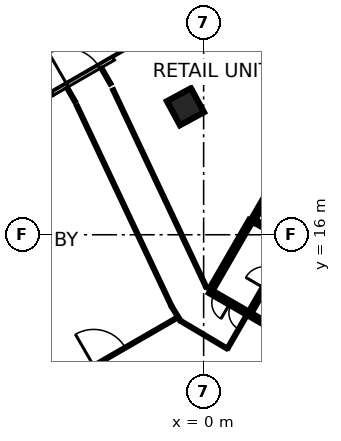
"""IFC4 building model, lengths in metres.
Left out: names, types, materials, properties, quantities, classifications, styles, units other than length and angle.
Written with IfcOpenShell. Run it as: python <this file> out.ifc"""

import sys

from ifc_helpers import new_model, si_unit, direction, frame, frame_2d, origin, origin_2d, place, context, subcontext, project, spatial, rectangle, extrude, element, fill, save


model = new_model("IFC4")
c1 = context("Model", 3, precision=1e-05, world=origin(), true_north=direction((0.0, 1.0)))
c2 = subcontext(c1, "Body", "Model", "MODEL_VIEW")
j1 = project(units=[si_unit("LENGTHUNIT", "METRE"), si_unit("PLANEANGLEUNIT", "RADIAN")], contexts=[c1])
p1 = place(None, origin())
s1 = spatial("IfcSite", under=j1, at=p1, CompositionType="ELEMENT")
p2 = place(p1, origin())
s2 = spatial("IfcBuilding", under=s1, at=p2, CompositionType="ELEMENT")
p3 = place(p2, origin())
s3 = spatial("IfcBuildingStorey", under=s2, at=p3, CompositionType="ELEMENT", Elevation=0.0)
p4 = place(p3, frame((-1.197, 24.423, -0.45), z_axis=(0.0, 0.0, 1.0), x_axis=(-0.476198301069, 0.879337920289, 0.0)))
e1 = element("IfcColumn", 1, at=p4, inside=s3, PredefinedType="COLUMN", context=c2, shape_type="SweptSolid", body=[
    extrude(rectangle(XDim=1.8, YDim=1.8, at=origin_2d()), origin(), (0.0, 0.0, 1.0), 5.15),
])
p5 = place(p3, frame((-9.929, 25.29, 0.0), z_axis=(0.0, 0.0, 1.0), x_axis=(0.866216377649, 0.499669077583, 0.0)))
e2 = element("IfcWall", 2, at=p5, inside=s3, PredefinedType="SOLIDWALL", context=c2, shape_type="SweptSolid", body=[
    extrude(rectangle(XDim=4.62, YDim=0.25, at=frame_2d((2.31, 0.0))), origin(), (0.0, 0.0, 1.0), 7.1),
])
p6 = place(p5, frame((1.11, 0.0, 0.0)))
e3 = element("IfcOpeningElement", 3, at=p6, cuts=e2, PredefinedType="OPENING", context=c2, shape_type="SweptSolid", body=[
    extrude(rectangle(XDim=2.4, YDim=2.4, at=frame_2d((1.2, 1.2))), frame((0.0, 0.135, 0.0), z_axis=(0.0, -1.0, 0.0), x_axis=(1.0, 0.0, 0.0)), (0.0, 0.0, 1.0), 0.27),
])
p7 = place(p3, frame((-13.93, 22.982, 0.0), z_axis=(0.0, 0.0, 1.0), x_axis=(0.866216377649, 0.499669077583, 0.0)))
e4 = element("IfcWall", 4, at=p7, inside=s3, PredefinedType="SOLIDWALL", context=c2, shape_type="SweptSolid", body=[
    extrude(rectangle(XDim=4.62, YDim=0.25, at=frame_2d((2.31, 0.0))), origin(), (0.0, 0.0, 1.0), 7.1),
])
p8 = place(p3, frame((10.42, 6.498, 0.0), z_axis=(0.0, 0.0, 1.0), x_axis=(-0.866021906294, 0.500006057782, 0.0)))
e5 = element("IfcWall", 5, at=p8, inside=s3, PredefinedType="SHEAR", context=c2, shape_type="SweptSolid", body=[
    extrude(rectangle(XDim=11.55, YDim=0.25, at=frame_2d((5.775, 0.0))), origin(), (0.0, 0.0, 1.0), 7.1),
])
p9 = place(p8, frame((10.025, 0.0, 0.0)))
e6 = element("IfcOpeningElement", 6, at=p9, cuts=e5, PredefinedType="OPENING", context=c2, shape_type="SweptSolid", body=[
    extrude(rectangle(XDim=1.2, YDim=2.1, at=frame_2d((0.6, 1.05))), frame((0.0, 0.135, 0.0), z_axis=(0.0, -1.0, 0.0), x_axis=(1.0, 0.0, 0.0)), (0.0, 0.0, 1.0), 0.27),
])
p10 = place(p8, frame((8.725, 0.0, 0.0)))
e7 = element("IfcOpeningElement", 7, at=p10, cuts=e5, PredefinedType="OPENING", context=c2, shape_type="SweptSolid", body=[
    extrude(rectangle(XDim=1.2, YDim=2.1, at=frame_2d((0.6, 1.05))), frame((0.0, 0.135, 0.0), z_axis=(0.0, -1.0, 0.0), x_axis=(1.0, 0.0, 0.0)), (0.0, 0.0, 1.0), 0.27),
])
p11 = place(p3, frame((3.179, 16.856, 0.0), z_axis=(0.0, 0.0, 1.0), x_axis=(0.500004234368, 0.866022959057, 0.0)))
e8 = element("IfcWall", 8, at=p11, inside=s3, PredefinedType="SHEAR", context=c2, shape_type="SweptSolid", body=[
    extrude(rectangle(XDim=6.25, YDim=0.25, at=frame_2d((3.125, 0.0))), origin(), (0.0, 0.0, 1.0), 7.1),
])
p12 = place(p3, frame((0.48, 12.381, 0.0), z_axis=(0.0, 0.0, 1.0), x_axis=(0.49999885962, 0.866026062182, 0.0)))
e9 = element("IfcWall", 9, at=p12, inside=s3, PredefinedType="SHEAR", context=c2, shape_type="SweptSolid", body=[
    extrude(rectangle(XDim=5.225, YDim=0.25, at=frame_2d((2.612, 0.0))), origin(), (0.0, 0.0, 1.0), 7.1),
])
p13 = place(p3, frame((3.057, 10.895, 0.0), z_axis=(0.0, 0.0, 1.0), x_axis=(0.499989418164, 0.866031513124, 0.0)))
e10 = element("IfcWall", 10, at=p13, inside=s3, PredefinedType="SHEAR", context=c2, shape_type="SweptSolid", body=[
    extrude(rectangle(XDim=5.251, YDim=0.2, at=frame_2d((2.625, 0.0))), origin(), (0.0, 0.0, 1.0), 7.1),
])
p14 = place(p13, frame((1.849, 0.0, 0.0)))
e11 = element("IfcOpeningElement", 11, at=p14, cuts=e10, PredefinedType="OPENING", context=c2, shape_type="SweptSolid", body=[
    extrude(rectangle(XDim=1.4, YDim=2.1, at=frame_2d((0.7, 1.05))), frame((0.0, 0.11, 0.0), z_axis=(0.0, -1.0, 0.0), x_axis=(1.0, 0.0, 0.0)), (0.0, 0.0, 1.0), 0.22),
])
p15 = place(p3, frame((5.725, 15.531, 0.0), z_axis=(0.0, 0.0, 1.0), x_axis=(-0.866037306777, 0.499979382845, 0.0)))
e12 = element("IfcWall", 12, at=p15, inside=s3, PredefinedType="SHEAR", context=c2, shape_type="SweptSolid", body=[
    extrude(rectangle(XDim=2.742, YDim=0.2, at=frame_2d((1.371, 0.0))), origin(), (0.0, 0.0, 1.0), 7.1),
])
p16 = place(p15, frame((0.743, 0.0, 0.0)))
e13 = element("IfcOpeningElement", 13, at=p16, cuts=e12, PredefinedType="OPENING", context=c2, shape_type="SweptSolid", body=[
    extrude(rectangle(XDim=1.3, YDim=2.1, at=frame_2d((0.65, 1.05))), frame((0.0, 0.11, 0.0), z_axis=(0.0, -1.0, 0.0), x_axis=(1.0, 0.0, 0.0)), (0.0, 0.0, 1.0), 0.22),
])
p17 = place(p3, frame((-8.996, 25.695, 0.0), z_axis=(0.0, 0.0, 1.0), x_axis=(0.499734982339, -0.866178357746, 0.0)))
e14 = element("IfcWall", 14, at=p17, inside=s3, PredefinedType="PARTITIONING", context=c2, shape_type="SweptSolid", body=[
    extrude(rectangle(XDim=1.125, YDim=0.2, at=frame_2d((0.562, 0.0))), origin(), (0.0, 0.0, 1.0), 7.1),
])
p18 = place(p3, frame((-8.359, 24.54, 0.0), z_axis=(0.0, 0.0, 1.0), x_axis=(0.426724650049, -0.904381597027, 0.0)))
e15 = element("IfcWall", 15, at=p18, inside=s3, PredefinedType="PARTITIONING", context=c2, shape_type="SweptSolid", body=[
    extrude(rectangle(XDim=14.649, YDim=0.2, at=frame_2d((7.324, 0.0))), origin(), (0.0, 0.0, 1.0), 4.7),
])
p19 = place(p3, frame((-6.744, 26.995, 0.0), z_axis=(0.0, 0.0, 1.0), x_axis=(0.499504866029, -0.866311080856, 0.0)))
e16 = element("IfcWall", 16, at=p19, inside=s3, PredefinedType="PARTITIONING", context=c2, shape_type="SweptSolid", body=[
    extrude(rectangle(XDim=1.295, YDim=0.2, at=frame_2d((0.647, 0.0))), origin(), (0.0, 0.0, 1.0), 7.1),
])
p20 = place(p3, frame((-5.981, 25.592, 0.0), z_axis=(0.0, 0.0, 1.0), x_axis=(0.426730602237, -0.904378788514, 0.0)))
e17 = element("IfcWall", 17, at=p20, inside=s3, PredefinedType="PARTITIONING", context=c2, shape_type="SweptSolid", body=[
    extrude(rectangle(XDim=14.442, YDim=0.2, at=frame_2d((7.221, 0.0))), origin(), (0.0, 0.0, 1.0), 4.7),
])
p21 = place(p3, frame((-2.108, 11.292, 0.0), z_axis=(0.0, 0.0, 1.0), x_axis=(0.523562666548, -0.85198716786, 0.0)))
e18 = element("IfcWall", 18, at=p21, inside=s3, PredefinedType="PARTITIONING", context=c2, shape_type="SweptSolid", body=[
    extrude(rectangle(XDim=1.121, YDim=0.2, at=frame_2d((0.561, 0.0))), origin(), (0.0, 0.0, 1.0), 7.1),
])
p22 = place(p3, frame((-1.521, 10.337, 0.0), z_axis=(0.0, 0.0, 1.0), x_axis=(0.859480916886, -0.511167833015, 0.0)))
e19 = element("IfcWall", 19, at=p22, inside=s3, PredefinedType="PARTITIONING", context=c2, shape_type="SweptSolid", body=[
    extrude(rectangle(XDim=3.586, YDim=0.2, at=frame_2d((1.793, 0.0))), origin(), (0.0, 0.0, 1.0), 7.1),
])
p23 = place(p3, frame((1.561, 8.504, 0.0), z_axis=(0.0, 0.0, 1.0), x_axis=(0.5001186023, 0.865956917885, 0.0)))
e20 = element("IfcWall", 20, at=p23, inside=s3, PredefinedType="PARTITIONING", context=c2, shape_type="SweptSolid", body=[
    extrude(rectangle(XDim=2.507, YDim=0.2, at=frame_2d((1.254, 0.0))), origin(), (0.0, 0.0, 1.0), 7.1),
])
p24 = place(p3, frame((-10.652, 5.399, 0.0), z_axis=(0.0, 0.0, 1.0), x_axis=(0.866043217385, 0.49996914467, 0.0)))
e21 = element("IfcWall", 21, at=p24, inside=s3, PredefinedType="PARTITIONING", context=c2, shape_type="SweptSolid", body=[
    extrude(rectangle(XDim=10.366, YDim=0.2, at=frame_2d((5.183, 0.0))), origin(), (0.0, 0.0, 1.0), 7.1),
])
p25 = place(p24, frame((3.948, 0.0, 0.0)))
e22 = element("IfcOpeningElement", 22, at=p25, cuts=e21, PredefinedType="OPENING", context=c2, shape_type="SweptSolid", body=[
    extrude(rectangle(XDim=2.4, YDim=2.1, at=frame_2d((1.2, 1.05))), frame((0.0, 0.11, 0.0), z_axis=(0.0, -1.0, 0.0), x_axis=(1.0, 0.0, 0.0)), (0.0, 0.0, 1.0), 0.22),
])
p26 = place(p6, origin())
e23 = element("IfcDoor", 23, at=p26, inside=s3, OperationType="DOUBLE_DOOR_DOUBLE_SWING", PredefinedType="DOOR", context=c2, shape_type="SweptSolid", body=[
    extrude(rectangle(XDim=2.4, YDim=2.4, at=frame_2d((1.2, 1.2))), frame((0.0, 0.025, 0.0), z_axis=(0.0, -1.0, 0.0), x_axis=(1.0, 0.0, 0.0)), (0.0, 0.0, 1.0), 0.05),
])
fill(e3, e23)
p27 = place(p9, origin())
e24 = element("IfcDoor", 24, at=p27, inside=s3, OperationType="SINGLE_SWING_LEFT", PredefinedType="DOOR", context=c2, shape_type="SweptSolid", body=[
    extrude(rectangle(XDim=1.2, YDim=2.1, at=frame_2d((0.6, 1.05))), frame((0.0, 0.025, 0.0), z_axis=(0.0, -1.0, 0.0), x_axis=(1.0, 0.0, 0.0)), (0.0, 0.0, 1.0), 0.05),
])
fill(e6, e24)
p28 = place(p10, origin())
e25 = element("IfcDoor", 25, at=p28, inside=s3, OperationType="SINGLE_SWING_RIGHT", PredefinedType="DOOR", context=c2, shape_type="SweptSolid", body=[
    extrude(rectangle(XDim=1.2, YDim=2.1, at=frame_2d((0.6, 1.05))), frame((0.0, 0.025, 0.0), z_axis=(0.0, -1.0, 0.0), x_axis=(1.0, 0.0, 0.0)), (0.0, 0.0, 1.0), 0.05),
])
fill(e7, e25)
p29 = place(p25, origin())
e26 = element("IfcDoor", 26, at=p29, inside=s3, OperationType="DOUBLE_DOOR_SINGLE_SWING", PredefinedType="DOOR", context=c2, shape_type="SweptSolid", body=[
    extrude(rectangle(XDim=2.4, YDim=2.1, at=frame_2d((1.2, 1.05))), frame((0.0, 0.025, 0.0), z_axis=(0.0, -1.0, 0.0), x_axis=(1.0, 0.0, 0.0)), (0.0, 0.0, 1.0), 0.05),
])
fill(e22, e26)
save(model, sys.argv[1])
